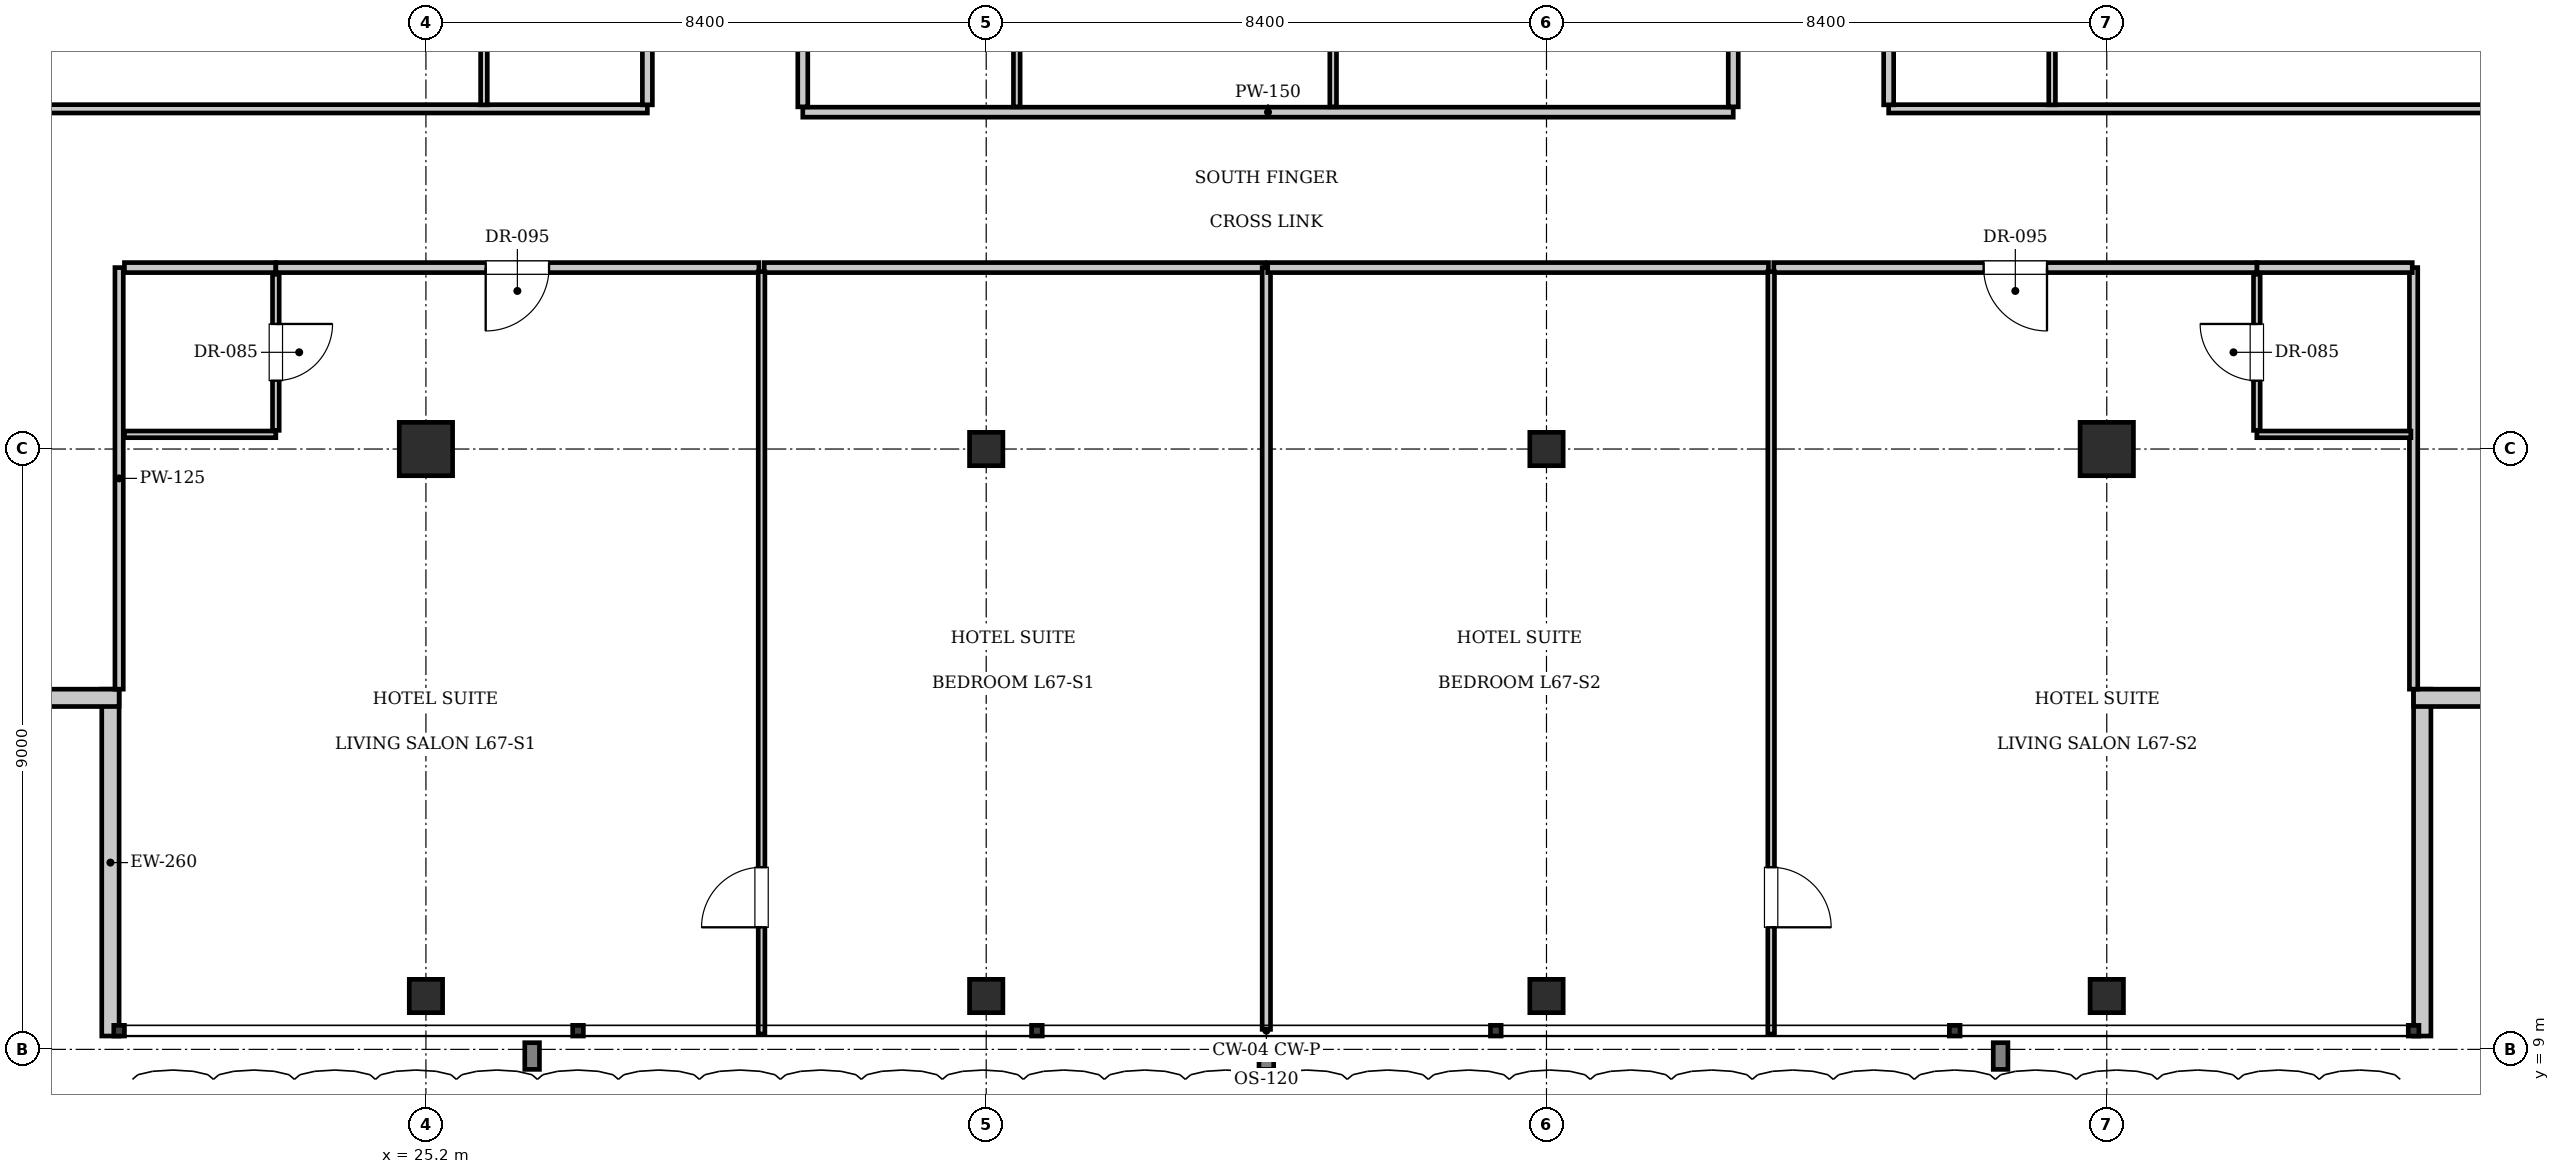
"""IFC4 building model, lengths in metres.
Left out: names, types, materials, properties, quantities, classifications, styles, units other than length and angle.
Written with IfcOpenShell. Run it as: python <this file> out.ifc"""

import sys

from ifc_helpers import new_model, si_unit, direction, frame, frame_2d, origin, origin_2d, place, context, subcontext, project, spatial, rectangle, i_section, extrude, element, fill, save


model = new_model("IFC4")
c1 = context("Model", 3, precision=1e-05, world=origin(), true_north=direction((0.0, 1.0)))
c2 = subcontext(c1, "Body", "Model", "MODEL_VIEW")
j1 = project(units=[si_unit("LENGTHUNIT", "METRE"), si_unit("PLANEANGLEUNIT", "RADIAN")], contexts=[c1])
p1 = place(None, origin())
s1 = spatial("IfcSite", under=j1, at=p1, CompositionType="ELEMENT")
p2 = place(p1, origin())
s2 = spatial("IfcBuilding", under=s1, at=p2, CompositionType="ELEMENT")
p3 = place(p2, frame((0.0, 0.0, 274.05)))
s3 = spatial("IfcBuildingStorey", under=s2, at=p3, CompositionType="ELEMENT", Elevation=274.05)
for number, where, z_axis, x_axis in (
    (1, (25.2, 18.0, 0.0), (0.0, 0.0, 1.0), (1.0, 0.0, 0.0)),
    (2, (50.4, 18.0, 0.0), (0.0, 0.0, 1.0), (1.0, 0.0, 0.0)),
):
    element("IfcColumn", number, at=place(p3, frame(where, z_axis=z_axis, x_axis=x_axis)), inside=s3, PredefinedType="COLUMN", context=c2, shape_type="SweptSolid", body=[
        extrude(rectangle(XDim=0.8, YDim=0.8, at=origin_2d()), origin(), (0.0, 0.0, 1.0), 3.85),
    ])
for number, where, z_axis, x_axis in (
    (3, (33.6, 18.0, 0.0), (0.0, 0.0, 1.0), (1.0, 0.0, 0.0)),
    (4, (42.0, 18.0, 0.0), (0.0, 0.0, 1.0), (1.0, 0.0, 0.0)),
    (5, (25.2, 9.8, 0.0), (0.0, 0.0, 1.0), (1.0, 0.0, 0.0)),
    (6, (33.6, 9.8, 0.0), (0.0, 0.0, 1.0), (1.0, 0.0, 0.0)),
    (7, (42.0, 9.8, 0.0), (0.0, 0.0, 1.0), (1.0, 0.0, 0.0)),
    (8, (50.4, 9.8, 0.0), (0.0, 0.0, 1.0), (1.0, 0.0, 0.0)),
):
    element("IfcColumn", number, at=place(p3, frame(where, z_axis=z_axis, x_axis=x_axis)), inside=s3, PredefinedType="COLUMN", context=c2, shape_type="SweptSolid", body=[
        extrude(i_section(OverallWidth=0.5, OverallDepth=0.5, WebThickness=0.022, FlangeThickness=0.032, at=origin_2d()), origin(), (0.0, 0.0, 1.0), 3.85),
    ])
p4 = place(p3, frame((20.47, 9.2, 0.0), z_axis=(0.0, 0.0, 1.0), x_axis=(0.0, 1.0, 0.0)))
e9 = element("IfcWall", 9, at=p4, inside=s3, PredefinedType="SOLIDWALL", context=c2, shape_type="SweptSolid", body=[
    extrude(rectangle(XDim=5.2, YDim=0.26, at=frame_2d((2.6, 0.0))), origin(), (0.0, 0.0, 1.0), 3.61),
])
p5 = place(p3, frame((20.6, 14.27, 0.0), z_axis=(0.0, 0.0, 1.0), x_axis=(-1.0, 0.0, 0.0)))
e10 = element("IfcWall", 10, at=p5, inside=s3, PredefinedType="SOLIDWALL", context=c2, shape_type="SweptSolid", body=[
    extrude(rectangle(XDim=5.2, YDim=0.26, at=frame_2d((2.6, 0.0))), origin(), (0.0, 0.0, 1.0), 3.61),
])
p6 = place(p5, frame((1.6, 0.0, 0.9)))
e11 = element("IfcOpeningElement", 11, at=p6, cuts=e10, PredefinedType="OPENING", context=c2, shape_type="SweptSolid", body=[
    extrude(rectangle(XDim=2.0, YDim=2.2, at=frame_2d((1.0, 1.1))), frame((0.0, 0.14, 0.0), z_axis=(0.0, -1.0, 0.0), x_axis=(1.0, 0.0, 0.0)), (0.0, 0.0, 1.0), 0.28),
])
p7 = place(p3, frame((55.13, 14.4, 0.0), z_axis=(0.0, 0.0, 1.0), x_axis=(0.0, -1.0, 0.0)))
e12 = element("IfcWall", 12, at=p7, inside=s3, PredefinedType="SOLIDWALL", context=c2, shape_type="SweptSolid", body=[
    extrude(rectangle(XDim=5.2, YDim=0.26, at=frame_2d((2.6, 0.0))), origin(), (0.0, 0.0, 1.0), 3.61),
])
p8 = place(p3, frame((60.2, 14.27, 0.0), z_axis=(0.0, 0.0, 1.0), x_axis=(-1.0, 0.0, 0.0)))
e13 = element("IfcWall", 13, at=p8, inside=s3, PredefinedType="SOLIDWALL", context=c2, shape_type="SweptSolid", body=[
    extrude(rectangle(XDim=5.2, YDim=0.26, at=frame_2d((2.6, 0.0))), origin(), (0.0, 0.0, 1.0), 3.61),
])
p9 = place(p8, frame((1.6, 0.0, 0.9)))
e14 = element("IfcOpeningElement", 14, at=p9, cuts=e13, PredefinedType="OPENING", context=c2, shape_type="SweptSolid", body=[
    extrude(rectangle(XDim=2.0, YDim=2.2, at=frame_2d((1.0, 1.1))), frame((0.0, 0.14, 0.0), z_axis=(0.0, -1.0, 0.0), x_axis=(1.0, 0.0, 0.0)), (0.0, 0.0, 1.0), 0.28),
])
p10 = place(p3, frame((30.85, 23.05, 0.0), z_axis=(0.0, 0.0, 1.0), x_axis=(1.0, 0.0, 0.0)))
e15 = element("IfcWall", 15, at=p10, inside=s3, PredefinedType="PARTITIONING", context=c2, shape_type="SweptSolid", body=[
    extrude(rectangle(XDim=13.95, YDim=0.15, at=frame_2d((6.975, 0.0))), origin(), (0.0, 0.0, 1.0), 3.61),
])
for number, where, z_axis, x_axis in (
    (16, (30.85, 23.13, 0.0), (0.0, 0.0, 1.0), (0.0, 1.0, 0.0)),
    (17, (44.8, 23.13, 0.0), (0.0, 0.0, 1.0), (0.0, 1.0, 0.0)),
):
    element("IfcWall", number, at=place(p3, frame(where, z_axis=z_axis, x_axis=x_axis)), inside=s3, PredefinedType="PARTITIONING", context=c2, shape_type="SweptSolid", body=[
        extrude(rectangle(XDim=7.89, YDim=0.15, at=frame_2d((3.945, 0.0))), origin(), (0.0, 0.0, 1.0), 3.61),
    ])
for number, where, z_axis, x_axis in (
    (18, (34.059, 23.13, 0.0), (0.0, 0.0, 1.0), (0.0, 1.0, 0.0)),
    (19, (38.802, 23.13, 0.0), (0.0, 0.0, 1.0), (0.0, 1.0, 0.0)),
):
    element("IfcWall", number, at=place(p3, frame(where, z_axis=z_axis, x_axis=x_axis)), inside=s3, PredefinedType="PARTITIONING", context=c2, shape_type="SweptSolid", body=[
        extrude(rectangle(XDim=7.89, YDim=0.1, at=frame_2d((3.945, 0.0))), origin(), (0.0, 0.0, 1.0), 3.61),
    ])
for number, where, z_axis, x_axis in (
    (20, (20.6, 14.4, 0.0), (0.0, 0.0, 1.0), (0.0, 1.0, 0.0)),
    (21, (55.0, 14.4, 0.0), (0.0, 0.0, 1.0), (0.0, 1.0, 0.0)),
):
    element("IfcWall", number, at=place(p3, frame(where, z_axis=z_axis, x_axis=x_axis)), inside=s3, PredefinedType="PARTITIONING", context=c2, shape_type="SweptSolid", body=[
        extrude(rectangle(XDim=6.32, YDim=0.125, at=frame_2d((3.16, 0.0))), origin(), (0.0, 0.0, 1.0), 3.61),
    ])
p11 = place(p3, frame((20.68, 20.72, 0.0), z_axis=(0.0, 0.0, 1.0), x_axis=(1.0, 0.0, 0.0)))
e22 = element("IfcWall", 22, at=p11, inside=s3, PredefinedType="PARTITIONING", context=c2, shape_type="SweptSolid", body=[
    extrude(rectangle(XDim=2.27, YDim=0.15, at=frame_2d((1.135, 0.0))), origin(), (0.0, 0.0, 1.0), 3.61),
])
p12 = place(p3, frame((20.68, 18.22, 0.0), z_axis=(0.0, 0.0, 1.0), x_axis=(1.0, 0.0, 0.0)))
e23 = element("IfcWall", 23, at=p12, inside=s3, PredefinedType="PARTITIONING", context=c2, shape_type="SweptSolid", body=[
    extrude(rectangle(XDim=2.27, YDim=0.1, at=frame_2d((1.135, 0.0))), origin(), (0.0, 0.0, 1.0), 3.61),
])
p13 = place(p3, frame((22.95, 18.28, 0.0), z_axis=(0.0, 0.0, 1.0), x_axis=(0.0, 1.0, 0.0)))
e24 = element("IfcWall", 24, at=p13, inside=s3, PredefinedType="PARTITIONING", context=c2, shape_type="SweptSolid", body=[
    extrude(rectangle(XDim=2.34, YDim=0.1, at=frame_2d((1.17, 0.0))), origin(), (0.0, 0.0, 1.0), 3.61),
])
p14 = place(p13, frame((0.745, 0.0, 0.0)))
e25 = element("IfcOpeningElement", 25, at=p14, cuts=e24, PredefinedType="OPENING", context=c2, shape_type="SweptSolid", body=[
    extrude(rectangle(XDim=0.85, YDim=2.1, at=frame_2d((0.425, 1.05))), frame((0.0, 0.06, 0.0), z_axis=(0.0, -1.0, 0.0), x_axis=(1.0, 0.0, 0.0)), (0.0, 0.0, 1.0), 0.12),
])
p15 = place(p3, frame((22.95, 20.72, 0.0), z_axis=(0.0, 0.0, 1.0), x_axis=(1.0, 0.0, 0.0)))
e26 = element("IfcWall", 26, at=p15, inside=s3, PredefinedType="PARTITIONING", context=c2, shape_type="SweptSolid", body=[
    extrude(rectangle(XDim=7.242, YDim=0.15, at=frame_2d((3.621, 0.0))), origin(), (0.0, 0.0, 1.0), 3.61),
])
p16 = place(p15, frame((3.146, 0.0, 0.0)))
e27 = element("IfcOpeningElement", 27, at=p16, cuts=e26, PredefinedType="OPENING", context=c2, shape_type="SweptSolid", body=[
    extrude(rectangle(XDim=0.95, YDim=2.15, at=frame_2d((0.475, 1.075))), frame((0.0, 0.085, 0.0), z_axis=(0.0, -1.0, 0.0), x_axis=(1.0, 0.0, 0.0)), (0.0, 0.0, 1.0), 0.17),
])
p17 = place(p3, frame((30.272, 20.72, 0.0), z_axis=(0.0, 0.0, 1.0), x_axis=(1.0, 0.0, 0.0)))
e28 = element("IfcWall", 28, at=p17, inside=s3, PredefinedType="PARTITIONING", context=c2, shape_type="SweptSolid", body=[
    extrude(rectangle(XDim=7.508, YDim=0.15, at=frame_2d((3.754, 0.0))), origin(), (0.0, 0.0, 1.0), 3.61),
])
p18 = place(p3, frame((30.232, 9.23, 0.0), z_axis=(0.0, 0.0, 1.0), x_axis=(0.0, 1.0, 0.0)))
e29 = element("IfcWall", 29, at=p18, inside=s3, PredefinedType="PARTITIONING", context=c2, shape_type="SweptSolid", body=[
    extrude(rectangle(XDim=11.43, YDim=0.1, at=frame_2d((5.715, 0.0))), origin(), (0.0, 0.0, 1.0), 3.61),
])
p19 = place(p18, frame((1.6, 0.0, 0.0)))
e30 = element("IfcOpeningElement", 30, at=p19, cuts=e29, PredefinedType="OPENING", context=c2, shape_type="SweptSolid", body=[
    extrude(rectangle(XDim=0.9, YDim=2.1, at=frame_2d((0.45, 1.05))), frame((0.0, 0.06, 0.0), z_axis=(0.0, -1.0, 0.0), x_axis=(1.0, 0.0, 0.0)), (0.0, 0.0, 1.0), 0.12),
])
p20 = place(p3, frame((37.8, 9.3, 0.0), z_axis=(0.0, 0.0, 1.0), x_axis=(0.0, 1.0, 0.0)))
e31 = element("IfcWall", 31, at=p20, inside=s3, PredefinedType="PARTITIONING", context=c2, shape_type="SweptSolid", body=[
    extrude(rectangle(XDim=11.42, YDim=0.125, at=frame_2d((5.71, 0.0))), origin(), (0.0, 0.0, 1.0), 3.304),
])
p21 = place(p3, frame((52.65, 20.72, 0.0), z_axis=(0.0, 0.0, 1.0), x_axis=(1.0, 0.0, 0.0)))
e32 = element("IfcWall", 32, at=p21, inside=s3, PredefinedType="PARTITIONING", context=c2, shape_type="SweptSolid", body=[
    extrude(rectangle(XDim=2.33, YDim=0.15, at=frame_2d((1.165, 0.0))), origin(), (0.0, 0.0, 1.0), 3.61),
])
p22 = place(p3, frame((52.65, 18.22, 0.0), z_axis=(0.0, 0.0, 1.0), x_axis=(1.0, 0.0, 0.0)))
e33 = element("IfcWall", 33, at=p22, inside=s3, PredefinedType="PARTITIONING", context=c2, shape_type="SweptSolid", body=[
    extrude(rectangle(XDim=2.31, YDim=0.1, at=frame_2d((1.155, 0.0))), origin(), (0.0, 0.0, 1.0), 3.61),
])
p23 = place(p3, frame((52.65, 18.28, 0.0), z_axis=(0.0, 0.0, 1.0), x_axis=(0.0, 1.0, 0.0)))
e34 = element("IfcWall", 34, at=p23, inside=s3, PredefinedType="PARTITIONING", context=c2, shape_type="SweptSolid", body=[
    extrude(rectangle(XDim=2.34, YDim=0.1, at=frame_2d((1.17, 0.0))), origin(), (0.0, 0.0, 1.0), 3.61),
])
p24 = place(p23, frame((0.745, 0.0, 0.0)))
e35 = element("IfcOpeningElement", 35, at=p24, cuts=e34, PredefinedType="OPENING", context=c2, shape_type="SweptSolid", body=[
    extrude(rectangle(XDim=0.85, YDim=2.1, at=frame_2d((0.425, 1.05))), frame((0.0, 0.06, 0.0), z_axis=(0.0, -1.0, 0.0), x_axis=(1.0, 0.0, 0.0)), (0.0, 0.0, 1.0), 0.12),
])
p25 = place(p3, frame((37.82, 20.72, 0.0), z_axis=(0.0, 0.0, 1.0), x_axis=(1.0, 0.0, 0.0)))
e36 = element("IfcWall", 36, at=p25, inside=s3, PredefinedType="PARTITIONING", context=c2, shape_type="SweptSolid", body=[
    extrude(rectangle(XDim=7.508, YDim=0.15, at=frame_2d((3.754, 0.0))), origin(), (0.0, 0.0, 1.0), 3.61),
])
p26 = place(p3, frame((45.408, 20.72, 0.0), z_axis=(0.0, 0.0, 1.0), x_axis=(1.0, 0.0, 0.0)))
e37 = element("IfcWall", 37, at=p26, inside=s3, PredefinedType="PARTITIONING", context=c2, shape_type="SweptSolid", body=[
    extrude(rectangle(XDim=7.242, YDim=0.15, at=frame_2d((3.621, 0.0))), origin(), (0.0, 0.0, 1.0), 3.61),
])
p27 = place(p26, frame((3.146, 0.0, 0.0)))
e38 = element("IfcOpeningElement", 38, at=p27, cuts=e37, PredefinedType="OPENING", context=c2, shape_type="SweptSolid", body=[
    extrude(rectangle(XDim=0.95, YDim=2.15, at=frame_2d((0.475, 1.075))), frame((0.0, 0.085, 0.0), z_axis=(0.0, -1.0, 0.0), x_axis=(1.0, 0.0, 0.0)), (0.0, 0.0, 1.0), 0.17),
])
p28 = place(p3, frame((45.368, 9.23, 0.0), z_axis=(0.0, 0.0, 1.0), x_axis=(0.0, 1.0, 0.0)))
e39 = element("IfcWall", 39, at=p28, inside=s3, PredefinedType="PARTITIONING", context=c2, shape_type="SweptSolid", body=[
    extrude(rectangle(XDim=11.43, YDim=0.1, at=frame_2d((5.715, 0.0))), origin(), (0.0, 0.0, 1.0), 3.61),
])
p29 = place(p28, frame((1.6, 0.0, 0.0)))
e40 = element("IfcOpeningElement", 40, at=p29, cuts=e39, PredefinedType="OPENING", context=c2, shape_type="SweptSolid", body=[
    extrude(rectangle(XDim=0.9, YDim=2.1, at=frame_2d((0.45, 1.05))), frame((0.0, 0.06, 0.0), z_axis=(0.0, -1.0, 0.0), x_axis=(1.0, 0.0, 0.0)), (0.0, 0.0, 1.0), 0.12),
])
p30 = place(p3, frame((15.5, 23.1, 0.0), z_axis=(0.0, 0.0, 1.0), x_axis=(1.0, 0.0, 0.0)))
e41 = element("IfcWall", 41, at=p30, inside=s3, PredefinedType="PARTITIONING", context=c2, shape_type="SweptSolid", body=[
    extrude(rectangle(XDim=13.02, YDim=0.125, at=frame_2d((6.51, 0.0))), origin(), (0.0, 0.0, 1.0), 3.61),
])
p31 = place(p3, frame((47.13, 23.1, 0.0), z_axis=(0.0, 0.0, 1.0), x_axis=(1.0, 0.0, 0.0)))
e42 = element("IfcWall", 42, at=p31, inside=s3, PredefinedType="PARTITIONING", context=c2, shape_type="SweptSolid", body=[
    extrude(rectangle(XDim=12.97, YDim=0.125, at=frame_2d((6.485, 0.0))), origin(), (0.0, 0.0, 1.0), 3.61),
])
p32 = place(p3, frame((28.52, 23.16, 0.0), z_axis=(0.0, 0.0, 1.0), x_axis=(0.0, 1.0, 0.0)))
e43 = element("IfcWall", 43, at=p32, inside=s3, PredefinedType="PARTITIONING", context=c2, shape_type="SweptSolid", body=[
    extrude(rectangle(XDim=1.89, YDim=0.15, at=frame_2d((0.945, 0.0))), origin(), (0.0, 0.0, 1.0), 3.61),
])
p33 = place(p3, frame((26.07, 23.16, 0.0), z_axis=(0.0, 0.0, 1.0), x_axis=(0.0, 1.0, 0.0)))
e44 = element("IfcWall", 44, at=p33, inside=s3, PredefinedType="PARTITIONING", context=c2, shape_type="SweptSolid", body=[
    extrude(rectangle(XDim=1.89, YDim=0.1, at=frame_2d((0.945, 0.0))), origin(), (0.0, 0.0, 1.0), 3.61),
])
p34 = place(p3, frame((47.13, 23.16, 0.0), z_axis=(0.0, 0.0, 1.0), x_axis=(0.0, 1.0, 0.0)))
e45 = element("IfcWall", 45, at=p34, inside=s3, PredefinedType="PARTITIONING", context=c2, shape_type="SweptSolid", body=[
    extrude(rectangle(XDim=1.89, YDim=0.15, at=frame_2d((0.945, 0.0))), origin(), (0.0, 0.0, 1.0), 3.61),
])
p35 = place(p3, frame((49.58, 23.16, 0.0), z_axis=(0.0, 0.0, 1.0), x_axis=(0.0, 1.0, 0.0)))
e46 = element("IfcWall", 46, at=p35, inside=s3, PredefinedType="PARTITIONING", context=c2, shape_type="SweptSolid", body=[
    extrude(rectangle(XDim=1.89, YDim=0.1, at=frame_2d((0.945, 0.0))), origin(), (0.0, 0.0, 1.0), 3.61),
])
p36 = place(p14, frame((0.85, 0.0, 0.0), z_axis=(0.0, 0.0, 1.0), x_axis=(-1.0, 0.0, 0.0)))
e47 = element("IfcDoor", 47, at=p36, inside=s3, OperationType="SINGLE_SWING_LEFT", PredefinedType="DOOR", context=c2, shape_type="SweptSolid", body=[
    extrude(rectangle(XDim=0.85, YDim=2.1, at=frame_2d((0.425, 1.05))), frame((0.0, 0.025, 0.0), z_axis=(0.0, -1.0, 0.0), x_axis=(1.0, 0.0, 0.0)), (0.0, 0.0, 1.0), 0.05),
])
fill(e25, e47)
p37 = place(p16, frame((0.95, 0.0, 0.0), z_axis=(0.0, 0.0, 1.0), x_axis=(-1.0, 0.0, 0.0)))
e48 = element("IfcDoor", 48, at=p37, inside=s3, OperationType="SINGLE_SWING_RIGHT", PredefinedType="DOOR", context=c2, shape_type="SweptSolid", body=[
    extrude(rectangle(XDim=0.95, YDim=2.15, at=frame_2d((0.475, 1.075))), frame((0.0, 0.025, 0.0), z_axis=(0.0, -1.0, 0.0), x_axis=(1.0, 0.0, 0.0)), (0.0, 0.0, 1.0), 0.05),
])
fill(e27, e48)
p38 = place(p19, origin())
e49 = element("IfcDoor", 49, at=p38, inside=s3, OperationType="SINGLE_SWING_LEFT", PredefinedType="DOOR", context=c2, shape_type="SweptSolid", body=[
    extrude(rectangle(XDim=0.9, YDim=2.1, at=frame_2d((0.45, 1.05))), frame((0.0, 0.025, 0.0), z_axis=(0.0, -1.0, 0.0), x_axis=(1.0, 0.0, 0.0)), (0.0, 0.0, 1.0), 0.05),
])
fill(e30, e49)
p39 = place(p24, origin())
e50 = element("IfcDoor", 50, at=p39, inside=s3, OperationType="SINGLE_SWING_RIGHT", PredefinedType="DOOR", context=c2, shape_type="SweptSolid", body=[
    extrude(rectangle(XDim=0.85, YDim=2.1, at=frame_2d((0.425, 1.05))), frame((0.0, 0.025, 0.0), z_axis=(0.0, -1.0, 0.0), x_axis=(1.0, 0.0, 0.0)), (0.0, 0.0, 1.0), 0.05),
])
fill(e35, e50)
p40 = place(p27, frame((0.95, 0.0, 0.0), z_axis=(0.0, 0.0, 1.0), x_axis=(-1.0, 0.0, 0.0)))
e51 = element("IfcDoor", 51, at=p40, inside=s3, OperationType="SINGLE_SWING_LEFT", PredefinedType="DOOR", context=c2, shape_type="SweptSolid", body=[
    extrude(rectangle(XDim=0.95, YDim=2.15, at=frame_2d((0.475, 1.075))), frame((0.0, 0.025, 0.0), z_axis=(0.0, -1.0, 0.0), x_axis=(1.0, 0.0, 0.0)), (0.0, 0.0, 1.0), 0.05),
])
fill(e38, e51)
p41 = place(p29, frame((0.9, 0.0, 0.0), z_axis=(0.0, 0.0, 1.0), x_axis=(-1.0, 0.0, 0.0)))
e52 = element("IfcDoor", 52, at=p41, inside=s3, OperationType="SINGLE_SWING_RIGHT", PredefinedType="DOOR", context=c2, shape_type="SweptSolid", body=[
    extrude(rectangle(XDim=0.9, YDim=2.1, at=frame_2d((0.45, 1.05))), frame((0.0, 0.025, 0.0), z_axis=(0.0, -1.0, 0.0), x_axis=(1.0, 0.0, 0.0)), (0.0, 0.0, 1.0), 0.05),
])
fill(e40, e52)
save(model, sys.argv[1])
